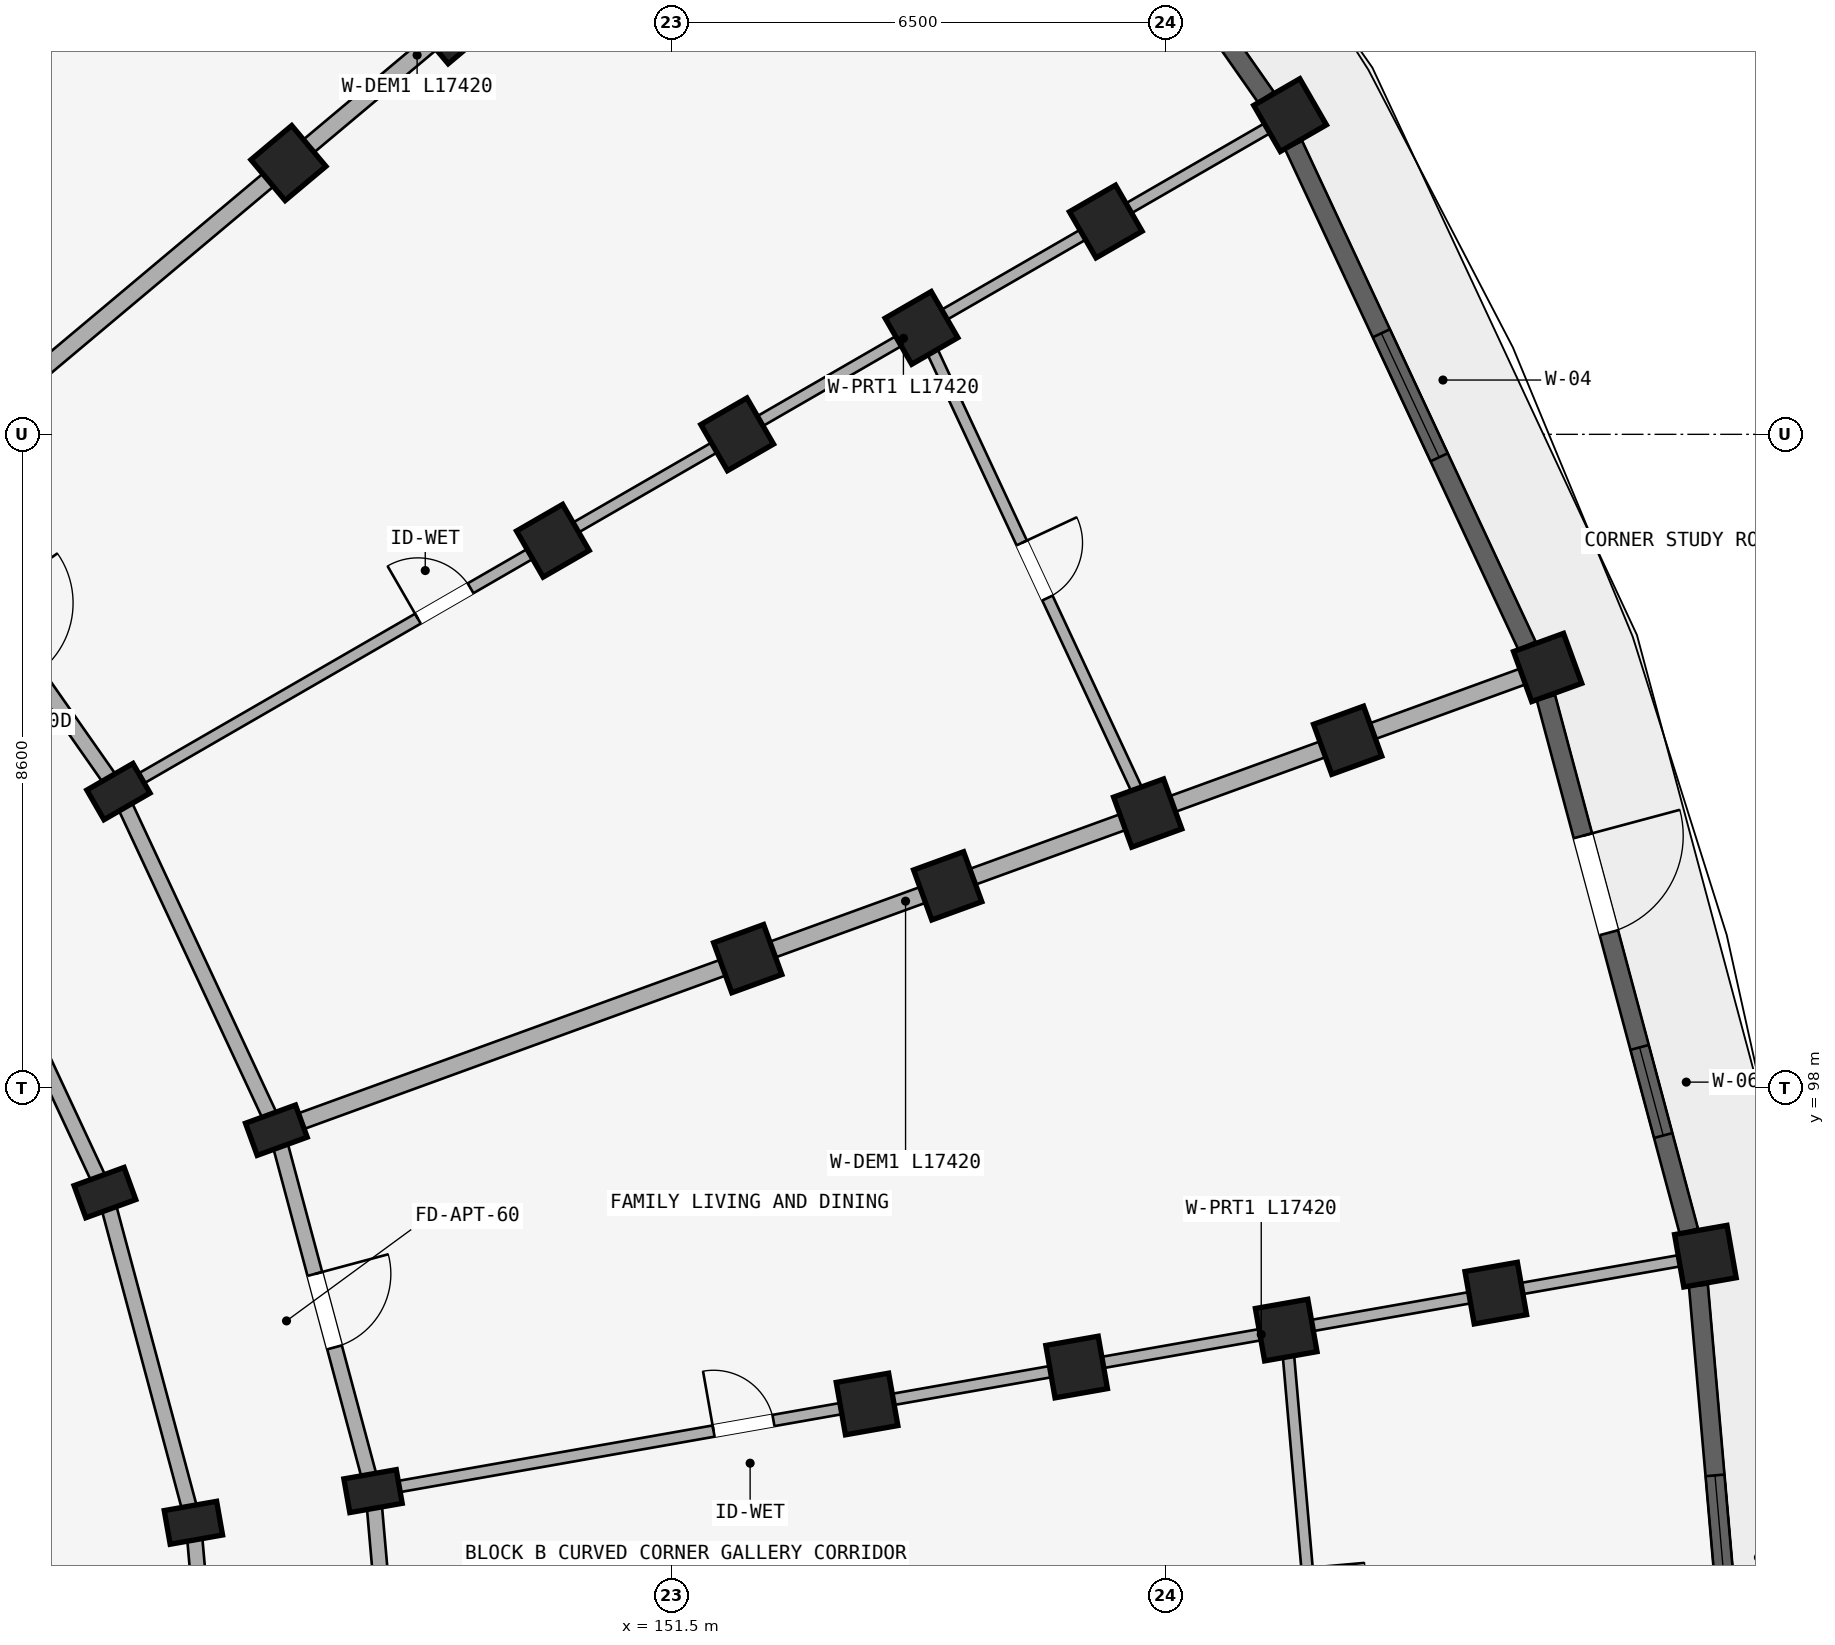
"""IFC4 building model, lengths in metres.
Left out: names, types, materials, properties, quantities, classifications, styles, units other than length and angle.
Written with IfcOpenShell. Run it as: python <this file> out.ifc"""

import sys

from ifc_helpers import new_model, si_unit, direction, frame, frame_2d, origin, origin_2d, place, context, subcontext, project, spatial, rectangle, extrude, element, fill, save


model = new_model("IFC4")
c1 = context("Model", 3, precision=1e-05, world=origin(), true_north=direction((0.0, 1.0)))
c2 = subcontext(c1, "Body", "Model", "MODEL_VIEW")
j1 = project(units=[si_unit("LENGTHUNIT", "METRE"), si_unit("PLANEANGLEUNIT", "RADIAN")], contexts=[c1])
p1 = place(None, origin())
s1 = spatial("IfcSite", under=j1, at=p1, CompositionType="ELEMENT")
p2 = place(p1, origin())
s2 = spatial("IfcBuilding", under=s1, at=p2, CompositionType="ELEMENT")
p3 = place(p2, frame((0.0, 0.0, 21.3)))
s3 = spatial("IfcBuildingStorey", under=s2, at=p3, CompositionType="ELEMENT", Elevation=21.3)
for number, where, z_axis, x_axis in (
    (1, (146.458, 110.169, 0.0), (0.0, 0.0, 1.0), (-0.643, 0.766, 0.0)),
    (2, (148.603, 111.969, 0.0), (0.0, 0.0, 1.0), (-0.643, 0.766, 0.0)),
):
    element("IfcColumn", number, at=place(p3, frame(where, z_axis=z_axis, x_axis=x_axis)), inside=s3, PredefinedType="COLUMN", context=c2, shape_type="SweptSolid", body=[
        extrude(rectangle(XDim=0.7, YDim=0.7, at=origin_2d()), origin(), (0.0, 0.0, 1.0), 2.93),
    ])
p4 = place(p3, frame((144.222, 101.9, 0.0), z_axis=(0.0, 0.0, 1.0), x_axis=(-0.5, 0.866025403784, 0.0)))
e3 = element("IfcColumn", 3, at=p4, inside=s3, PredefinedType="COLUMN", context=c2, shape_type="SweptSolid", body=[
    extrude(rectangle(XDim=0.45, YDim=0.7, at=origin_2d()), origin(), (0.0, 0.0, 1.0), 2.93),
])
for number, where, z_axis, x_axis in (
    (4, (149.938, 105.2, 0.0), (0.0, 0.0, 1.0), (-0.5, 0.866, 0.0)),
    (5, (152.363, 106.6, 0.0), (0.0, 0.0, 1.0), (-0.5, 0.866, 0.0)),
    (6, (154.787, 108.0, 0.0), (0.0, 0.0, 1.0), (-0.5, 0.866, 0.0)),
    (7, (157.212, 109.4, 0.0), (0.0, 0.0, 1.0), (-0.5, 0.866, 0.0)),
    (8, (159.637, 110.8, 0.0), (0.0, 0.0, 1.0), (-0.5, 0.866, 0.0)),
):
    element("IfcColumn", number, at=place(p3, frame(where, z_axis=z_axis, x_axis=x_axis)), inside=s3, PredefinedType="COLUMN", context=c2, shape_type="SweptSolid", body=[
        extrude(rectangle(XDim=0.7, YDim=0.7, at=origin_2d()), origin(), (0.0, 0.0, 1.0), 2.93),
    ])
for number, where, z_axis, x_axis in (
    (9, (144.044, 96.624, 0.0), (0.0, 0.0, 1.0), (-0.342, 0.94, 0.0)),
    (10, (146.299, 97.445, 0.0), (0.0, 0.0, 1.0), (-0.342, 0.94, 0.0)),
):
    element("IfcColumn", number, at=place(p3, frame(where, z_axis=z_axis, x_axis=x_axis)), inside=s3, PredefinedType="COLUMN", context=c2, shape_type="SweptSolid", body=[
        extrude(rectangle(XDim=0.45, YDim=0.7, at=origin_2d()), origin(), (0.0, 0.0, 1.0), 2.93),
    ])
for number, where, z_axis, x_axis in (
    (11, (152.501, 99.702, 0.0), (0.0, 0.0, 1.0), (-0.342, 0.94, 0.0)),
    (12, (155.132, 100.66, 0.0), (0.0, 0.0, 1.0), (-0.342, 0.94, 0.0)),
    (13, (157.764, 101.618, 0.0), (0.0, 0.0, 1.0), (-0.342, 0.94, 0.0)),
    (14, (160.395, 102.575, 0.0), (0.0, 0.0, 1.0), (-0.342, 0.94, 0.0)),
    (15, (163.026, 103.533, 0.0), (0.0, 0.0, 1.0), (-0.342, 0.94, 0.0)),
):
    element("IfcColumn", number, at=place(p3, frame(where, z_axis=z_axis, x_axis=x_axis)), inside=s3, PredefinedType="COLUMN", context=c2, shape_type="SweptSolid", body=[
        extrude(rectangle(XDim=0.7, YDim=0.7, at=origin_2d()), origin(), (0.0, 0.0, 1.0), 2.93),
    ])
for number, where, z_axis, x_axis in (
    (16, (145.208, 92.28, 0.0), (0.0, 0.0, 1.0), (-0.174, 0.985, 0.0)),
    (17, (147.572, 92.697, 0.0), (0.0, 0.0, 1.0), (-0.174, 0.985, 0.0)),
):
    element("IfcColumn", number, at=place(p3, frame(where, z_axis=z_axis, x_axis=x_axis)), inside=s3, PredefinedType="COLUMN", context=c2, shape_type="SweptSolid", body=[
        extrude(rectangle(XDim=0.45, YDim=0.7, at=origin_2d()), origin(), (0.0, 0.0, 1.0), 2.93),
    ])
for number, where, z_axis, x_axis in (
    (18, (154.071, 93.843, 0.0), (0.0, 0.0, 1.0), (-0.174, 0.985, 0.0)),
    (19, (156.829, 94.329, 0.0), (0.0, 0.0, 1.0), (-0.174, 0.985, 0.0)),
    (20, (159.586, 94.815, 0.0), (0.0, 0.0, 1.0), (-0.174, 0.985, 0.0)),
    (21, (162.344, 95.302, 0.0), (0.0, 0.0, 1.0), (-0.174, 0.985, 0.0)),
    (22, (165.101, 95.788, 0.0), (0.0, 0.0, 1.0), (-0.174, 0.985, 0.0)),
):
    element("IfcColumn", number, at=place(p3, frame(where, z_axis=z_axis, x_axis=x_axis)), inside=s3, PredefinedType="COLUMN", context=c2, shape_type="SweptSolid", body=[
        extrude(rectangle(XDim=0.7, YDim=0.7, at=origin_2d()), origin(), (0.0, 0.0, 1.0), 2.93),
    ])
p5 = place(p3, frame((141.402, 105.927, 0.0), z_axis=(0.0, 0.0, 1.0), x_axis=(0.573592335331, -0.819140911474, 0.0)))
e23 = element("IfcWall", 23, at=p5, inside=s3, PredefinedType="STANDARD", context=c2, shape_type="SweptSolid", body=[
    extrude(rectangle(XDim=4.916, YDim=0.2, at=frame_2d((2.458, 0.0))), origin(), (0.0, 0.0, 1.0), 2.372),
])
p6 = place(p5, frame((1.888, 0.0, 0.0)))
e24 = element("IfcOpeningElement", 24, at=p6, cuts=e23, PredefinedType="OPENING", context=c2, shape_type="SweptSolid", body=[
    extrude(rectangle(XDim=1.14, YDim=2.15, at=frame_2d((0.57, 1.075))), frame((0.0, 0.11, 0.0), z_axis=(0.0, -1.0, 0.0), x_axis=(1.0, 0.0, 0.0)), (0.0, 0.0, 1.0), 0.22),
])
p7 = place(p3, frame((142.144, 100.7, 0.0), z_axis=(0.0, 0.0, 1.0), x_axis=(0.422617978463, -0.906307919131, 0.0)))
e25 = element("IfcWall", 25, at=p7, inside=s3, PredefinedType="STANDARD", context=c2, shape_type="SweptSolid", body=[
    extrude(rectangle(XDim=4.497, YDim=0.2, at=frame_2d((2.249, 0.0))), origin(), (0.0, 0.0, 1.0), 2.372),
])
p8 = place(p3, frame((144.222, 101.9, 0.0), z_axis=(0.0, 0.0, 1.0), x_axis=(0.422629854778, -0.906302381024, 0.0)))
e26 = element("IfcWall", 26, at=p8, inside=s3, PredefinedType="STANDARD", context=c2, shape_type="SweptSolid", body=[
    extrude(rectangle(XDim=4.915, YDim=0.2, at=frame_2d((2.458, 0.0))), origin(), (0.0, 0.0, 1.0), 2.372),
])
p9 = place(p3, frame((144.044, 96.624, 0.0), z_axis=(0.0, 0.0, 1.0), x_axis=(0.258787642463, -0.965934240054, 0.0)))
e27 = element("IfcWall", 27, at=p9, inside=s3, PredefinedType="STANDARD", context=c2, shape_type="SweptSolid", body=[
    extrude(rectangle(XDim=4.497, YDim=0.2, at=frame_2d((2.249, 0.0))), origin(), (0.0, 0.0, 1.0), 2.372),
])
p10 = place(p3, frame((146.299, 97.445, 0.0), z_axis=(0.0, 0.0, 1.0), x_axis=(0.258803112091, -0.965930095386, 0.0)))
e28 = element("IfcWall", 28, at=p10, inside=s3, PredefinedType="STANDARD", context=c2, shape_type="SweptSolid", body=[
    extrude(rectangle(XDim=4.916, YDim=0.2, at=frame_2d((2.458, 0.0))), origin(), (0.0, 0.0, 1.0), 2.372),
])
p11 = place(p10, frame((1.958, 0.0, 0.0)))
e29 = element("IfcOpeningElement", 29, at=p11, cuts=e28, PredefinedType="OPENING", context=c2, shape_type="SweptSolid", body=[
    extrude(rectangle(XDim=1.0, YDim=2.15, at=frame_2d((0.5, 1.075))), frame((0.0, 0.11, 0.0), z_axis=(0.0, -1.0, 0.0), x_axis=(1.0, 0.0, 0.0)), (0.0, 0.0, 1.0), 0.22),
])
p12 = place(p3, frame((145.208, 92.28, 0.0), z_axis=(0.0, 0.0, 1.0), x_axis=(0.087187153726, -0.996191949488, 0.0)))
e30 = element("IfcWall", 30, at=p12, inside=s3, PredefinedType="STANDARD", context=c2, shape_type="SweptSolid", body=[
    extrude(rectangle(XDim=4.497, YDim=0.2, at=frame_2d((2.249, 0.0))), origin(), (0.0, 0.0, 1.0), 2.372),
])
p13 = place(p3, frame((147.572, 92.697, 0.0), z_axis=(0.0, 0.0, 1.0), x_axis=(0.087167566415, -0.996193663584, 0.0)))
e31 = element("IfcWall", 31, at=p13, inside=s3, PredefinedType="STANDARD", context=c2, shape_type="SweptSolid", body=[
    extrude(rectangle(XDim=4.916, YDim=0.2, at=frame_2d((2.458, 0.0))), origin(), (0.0, 0.0, 1.0), 2.372),
])
p14 = place(p3, frame((137.991, 109.479, 0.0), z_axis=(0.0, 0.0, 1.0), x_axis=(0.642784757967, 0.766046835987, 0.0)))
e32 = element("IfcWall", 32, at=p14, inside=s3, PredefinedType="PARTITIONING", context=c2, shape_type="SweptSolid", body=[
    extrude(rectangle(XDim=17.42, YDim=0.15, at=frame_2d((8.71, 0.0))), origin(), (0.0, 0.0, 1.0), 2.372),
])
p15 = place(p14, frame((4.45, 0.0, 0.0)))
e33 = element("IfcOpeningElement", 33, at=p15, cuts=e32, PredefinedType="OPENING", context=c2, shape_type="SweptSolid", body=[
    extrude(rectangle(XDim=0.8, YDim=2.1, at=frame_2d((0.4, 1.05))), frame((0.0, 0.085, 0.0), z_axis=(0.0, -1.0, 0.0), x_axis=(1.0, 0.0, 0.0)), (0.0, 0.0, 1.0), 0.17),
])
p16 = place(p3, frame((141.479, 105.991, 0.0), z_axis=(0.0, 0.0, 1.0), x_axis=(0.766046835987, 0.642784757967, 0.0)))
e34 = element("IfcWall", 34, at=p16, inside=s3, PredefinedType="STANDARD", context=c2, shape_type="SweptSolid", body=[
    extrude(rectangle(XDim=17.42, YDim=0.22, at=frame_2d((8.71, 0.0))), origin(), (0.0, 0.0, 1.0), 2.372),
])
p17 = place(p3, frame((144.309, 101.95, 0.0), z_axis=(0.0, 0.0, 1.0), x_axis=(0.866026648973, 0.499997843263, 0.0)))
e35 = element("IfcWall", 35, at=p17, inside=s3, PredefinedType="PARTITIONING", context=c2, shape_type="SweptSolid", body=[
    extrude(rectangle(XDim=17.42, YDim=0.15, at=frame_2d((8.71, 0.0))), origin(), (0.0, 0.0, 1.0), 2.372),
])
p18 = place(p17, frame((4.45, 0.0, 0.0)))
e36 = element("IfcOpeningElement", 36, at=p18, cuts=e35, PredefinedType="OPENING", context=c2, shape_type="SweptSolid", body=[
    extrude(rectangle(XDim=0.8, YDim=2.1, at=frame_2d((0.4, 1.05))), frame((0.0, 0.085, 0.0), z_axis=(0.0, -1.0, 0.0), x_axis=(1.0, 0.0, 0.0)), (0.0, 0.0, 1.0), 0.17),
])
p19 = place(p3, frame((146.393, 97.479, 0.0), z_axis=(0.0, 0.0, 1.0), x_axis=(0.939691901159, 0.342022120477, 0.0)))
e37 = element("IfcWall", 37, at=p19, inside=s3, PredefinedType="STANDARD", context=c2, shape_type="SweptSolid", body=[
    extrude(rectangle(XDim=17.42, YDim=0.22, at=frame_2d((8.71, 0.0))), origin(), (0.0, 0.0, 1.0), 2.372),
])
p20 = place(p3, frame((147.67, 92.714, 0.0), z_axis=(0.0, 0.0, 1.0), x_axis=(0.984808098809, 0.173646216546, 0.0)))
e38 = element("IfcWall", 38, at=p20, inside=s3, PredefinedType="PARTITIONING", context=c2, shape_type="SweptSolid", body=[
    extrude(rectangle(XDim=17.42, YDim=0.15, at=frame_2d((8.71, 0.0))), origin(), (0.0, 0.0, 1.0), 2.372),
])
p21 = place(p20, frame((4.45, 0.0, 0.0)))
e39 = element("IfcOpeningElement", 39, at=p21, cuts=e38, PredefinedType="OPENING", context=c2, shape_type="SweptSolid", body=[
    extrude(rectangle(XDim=0.8, YDim=2.1, at=frame_2d((0.4, 1.05))), frame((0.0, 0.085, 0.0), z_axis=(0.0, -1.0, 0.0), x_axis=(1.0, 0.0, 0.0)), (0.0, 0.0, 1.0), 0.17),
])
p22 = place(p3, frame((154.787, 108.0, 0.0), z_axis=(0.0, 0.0, 1.0), x_axis=(0.422640621205, -0.906297360311, 0.0)))
e40 = element("IfcWall", 40, at=p22, inside=s3, PredefinedType="PLUMBINGWALL", context=c2, shape_type="SweptSolid", body=[
    extrude(rectangle(XDim=7.042, YDim=0.15, at=frame_2d((3.521, 0.0))), origin(), (0.0, 0.0, 1.0), 2.372),
])
p23 = place(p22, frame((3.121, 0.0, 0.0)))
e41 = element("IfcOpeningElement", 41, at=p23, cuts=e40, PredefinedType="OPENING", context=c2, shape_type="SweptSolid", body=[
    extrude(rectangle(XDim=0.8, YDim=2.1, at=frame_2d((0.4, 1.05))), frame((0.0, 0.085, 0.0), z_axis=(0.0, -1.0, 0.0), x_axis=(1.0, 0.0, 0.0)), (0.0, 0.0, 1.0), 0.17),
])
p24 = place(p3, frame((159.586, 94.815, 0.0), z_axis=(0.0, 0.0, 1.0), x_axis=(0.087156198737, -0.996194658198, 0.0)))
e42 = element("IfcWall", 42, at=p24, inside=s3, PredefinedType="PLUMBINGWALL", context=c2, shape_type="SweptSolid", body=[
    extrude(rectangle(XDim=7.042, YDim=0.15, at=frame_2d((3.521, 0.0))), origin(), (0.0, 0.0, 1.0), 2.372),
])
p25 = place(p24, frame((3.141, 0.0, 0.0)))
e43 = element("IfcOpeningElement", 43, at=p25, cuts=e42, PredefinedType="OPENING", context=c2, shape_type="SweptSolid", body=[
    extrude(rectangle(XDim=0.76, YDim=2.05, at=frame_2d((0.38, 1.025))), frame((0.0, 0.085, 0.0), z_axis=(0.0, -1.0, 0.0), x_axis=(1.0, 0.0, 0.0)), (0.0, 0.0, 1.0), 0.17),
])
p26 = place(p3, frame((155.151, 116.989, 0.0), z_axis=(0.0, 0.0, 1.0), x_axis=(0.573566061701, -0.819159308599, 0.0)))
e44 = element("IfcWall", 44, at=p26, inside=s3, PredefinedType="STANDARD", context=c2, shape_type="SweptSolid", body=[
    extrude(rectangle(XDim=7.267, YDim=0.25, at=frame_2d((3.633, 0.0))), origin(), (0.0, 0.0, 1.0), 2.472),
])
p27 = place(p26, frame((2.658, 0.0, 0.422)))
e45 = element("IfcOpeningElement", 45, at=p27, cuts=e44, PredefinedType="OPENING", context=c2, shape_type="SweptSolid", body=[
    extrude(rectangle(XDim=1.95, YDim=1.85, at=frame_2d((0.975, 0.925))), frame((0.0, 0.135, 0.0), z_axis=(0.0, -1.0, 0.0), x_axis=(1.0, 0.0, 0.0)), (0.0, 0.0, 1.0), 0.27),
])
p28 = place(p3, frame((159.683, 110.406, 0.0), z_axis=(0.0, 0.0, 1.0), x_axis=(0.422627946127, -0.90630327107, 0.0)))
e46 = element("IfcWall", 46, at=p28, inside=s3, PredefinedType="STANDARD", context=c2, shape_type="SweptSolid", body=[
    extrude(rectangle(XDim=7.267, YDim=0.25, at=frame_2d((3.633, 0.0))), origin(), (0.0, 0.0, 1.0), 2.472),
])
p29 = place(p28, frame((2.733, 0.0, 0.622)))
e47 = element("IfcOpeningElement", 47, at=p29, cuts=e46, PredefinedType="OPENING", context=c2, shape_type="SweptSolid", body=[
    extrude(rectangle(XDim=1.8, YDim=1.65, at=frame_2d((0.9, 0.825))), frame((0.0, 0.135, 0.0), z_axis=(0.0, -1.0, 0.0), x_axis=(1.0, 0.0, 0.0)), (0.0, 0.0, 1.0), 0.27),
])
p30 = place(p3, frame((163.002, 103.137, 0.0), z_axis=(0.0, 0.0, 1.0), x_axis=(0.258802140196, -0.965930355787, 0.0)))
e48 = element("IfcWall", 48, at=p30, inside=s3, PredefinedType="STANDARD", context=c2, shape_type="SweptSolid", body=[
    extrude(rectangle(XDim=7.267, YDim=0.25, at=frame_2d((3.633, 0.0))), origin(), (0.0, 0.0, 1.0), 2.472),
])
p31 = place(p30, frame((4.766, 0.0, 0.522)))
e49 = element("IfcOpeningElement", 49, at=p31, cuts=e48, PredefinedType="OPENING", context=c2, shape_type="SweptSolid", body=[
    extrude(rectangle(XDim=1.2, YDim=1.5, at=frame_2d((0.6, 0.75))), frame((0.0, 0.135, 0.0), z_axis=(0.0, -1.0, 0.0), x_axis=(1.0, 0.0, 0.0)), (0.0, 0.0, 1.0), 0.27),
])
p32 = place(p30, frame((1.883, 0.0, 0.0)))
e50 = element("IfcOpeningElement", 50, at=p32, cuts=e48, PredefinedType="OPENING", context=c2, shape_type="SweptSolid", body=[
    extrude(rectangle(XDim=1.32, YDim=2.15, at=frame_2d((0.66, 1.075))), frame((0.0, 0.135, 0.0), z_axis=(0.0, -1.0, 0.0), x_axis=(1.0, 0.0, 0.0)), (0.0, 0.0, 1.0), 0.27),
])
p33 = place(p3, frame((165.009, 95.403, 0.0), z_axis=(0.0, 0.0, 1.0), x_axis=(0.08718487158, -0.99619214922, 0.0)))
e51 = element("IfcWall", 51, at=p33, inside=s3, PredefinedType="STANDARD", context=c2, shape_type="SweptSolid", body=[
    extrude(rectangle(XDim=7.267, YDim=0.25, at=frame_2d((3.633, 0.0))), origin(), (0.0, 0.0, 1.0), 2.472),
])
p34 = place(p33, frame((2.508, 0.0, 0.322)))
e52 = element("IfcOpeningElement", 52, at=p34, cuts=e51, PredefinedType="OPENING", context=c2, shape_type="SweptSolid", body=[
    extrude(rectangle(XDim=2.25, YDim=1.95, at=frame_2d((1.125, 0.975))), frame((0.0, 0.135, 0.0), z_axis=(0.0, -1.0, 0.0), x_axis=(1.0, 0.0, 0.0)), (0.0, 0.0, 1.0), 0.27),
])
p35 = place(p29, origin())
e53 = element("IfcWindow", 53, at=p35, inside=s3, PartitioningType="DOUBLE_PANEL_VERTICAL", PredefinedType="WINDOW", context=c2, shape_type="SweptSolid", body=[
    extrude(rectangle(XDim=1.8, YDim=1.65, at=frame_2d((0.9, 0.825))), frame((0.0, 0.03, 0.0), z_axis=(0.0, -1.0, 0.0), x_axis=(1.0, 0.0, 0.0)), (0.0, 0.0, 1.0), 0.06),
])
fill(e47, e53)
p36 = place(p31, origin())
e54 = element("IfcWindow", 54, at=p36, inside=s3, PartitioningType="SINGLE_PANEL", PredefinedType="WINDOW", context=c2, shape_type="SweptSolid", body=[
    extrude(rectangle(XDim=1.2, YDim=1.5, at=frame_2d((0.6, 0.75))), frame((0.0, 0.03, 0.0), z_axis=(0.0, -1.0, 0.0), x_axis=(1.0, 0.0, 0.0)), (0.0, 0.0, 1.0), 0.06),
])
fill(e49, e54)
p37 = place(p34, origin())
e55 = element("IfcWindow", 55, at=p37, inside=s3, PartitioningType="TRIPLE_PANEL_VERTICAL", PredefinedType="WINDOW", context=c2, shape_type="SweptSolid", body=[
    extrude(rectangle(XDim=2.25, YDim=1.95, at=frame_2d((1.125, 0.975))), frame((0.0, 0.03, 0.0), z_axis=(0.0, -1.0, 0.0), x_axis=(1.0, 0.0, 0.0)), (0.0, 0.0, 1.0), 0.06),
])
fill(e52, e55)
p38 = place(p18, frame((0.8, 0.0, 0.0), z_axis=(0.0, 0.0, 1.0), x_axis=(-1.0, 0.0, 0.0)))
e56 = element("IfcDoor", 56, at=p38, inside=s3, OperationType="SINGLE_SWING_RIGHT", PredefinedType="DOOR", context=c2, shape_type="SweptSolid", body=[
    extrude(rectangle(XDim=0.8, YDim=2.1, at=frame_2d((0.4, 1.05))), frame((0.0, 0.025, 0.0), z_axis=(0.0, -1.0, 0.0), x_axis=(1.0, 0.0, 0.0)), (0.0, 0.0, 1.0), 0.05),
])
fill(e36, e56)
p39 = place(p21, origin())
e57 = element("IfcDoor", 57, at=p39, inside=s3, OperationType="SINGLE_SWING_LEFT", PredefinedType="DOOR", context=c2, shape_type="SweptSolid", body=[
    extrude(rectangle(XDim=0.8, YDim=2.1, at=frame_2d((0.4, 1.05))), frame((0.0, 0.025, 0.0), z_axis=(0.0, -1.0, 0.0), x_axis=(1.0, 0.0, 0.0)), (0.0, 0.0, 1.0), 0.05),
])
fill(e39, e57)
p40 = place(p23, frame((0.8, 0.0, 0.0), z_axis=(0.0, 0.0, 1.0), x_axis=(-1.0, 0.0, 0.0)))
e58 = element("IfcDoor", 58, at=p40, inside=s3, OperationType="SINGLE_SWING_RIGHT", PredefinedType="DOOR", context=c2, shape_type="SweptSolid", body=[
    extrude(rectangle(XDim=0.8, YDim=2.1, at=frame_2d((0.4, 1.05))), frame((0.0, 0.025, 0.0), z_axis=(0.0, -1.0, 0.0), x_axis=(1.0, 0.0, 0.0)), (0.0, 0.0, 1.0), 0.05),
])
fill(e41, e58)
p41 = place(p11, origin())
e59 = element("IfcDoor", 59, at=p41, inside=s3, OperationType="SINGLE_SWING_LEFT", PredefinedType="DOOR", context=c2, shape_type="SweptSolid", body=[
    extrude(rectangle(XDim=1.0, YDim=2.15, at=frame_2d((0.5, 1.075))), frame((0.0, 0.025, 0.0), z_axis=(0.0, -1.0, 0.0), x_axis=(1.0, 0.0, 0.0)), (0.0, 0.0, 1.0), 0.05),
])
fill(e29, e59)
p42 = place(p32, origin())
e60 = element("IfcDoor", 60, at=p42, inside=s3, OperationType="SINGLE_SWING_LEFT", PredefinedType="DOOR", context=c2, shape_type="SweptSolid", body=[
    extrude(rectangle(XDim=1.32, YDim=2.15, at=frame_2d((0.66, 1.075))), frame((0.0, 0.025, 0.0), z_axis=(0.0, -1.0, 0.0), x_axis=(1.0, 0.0, 0.0)), (0.0, 0.0, 1.0), 0.05),
])
fill(e50, e60)
save(model, sys.argv[1])
